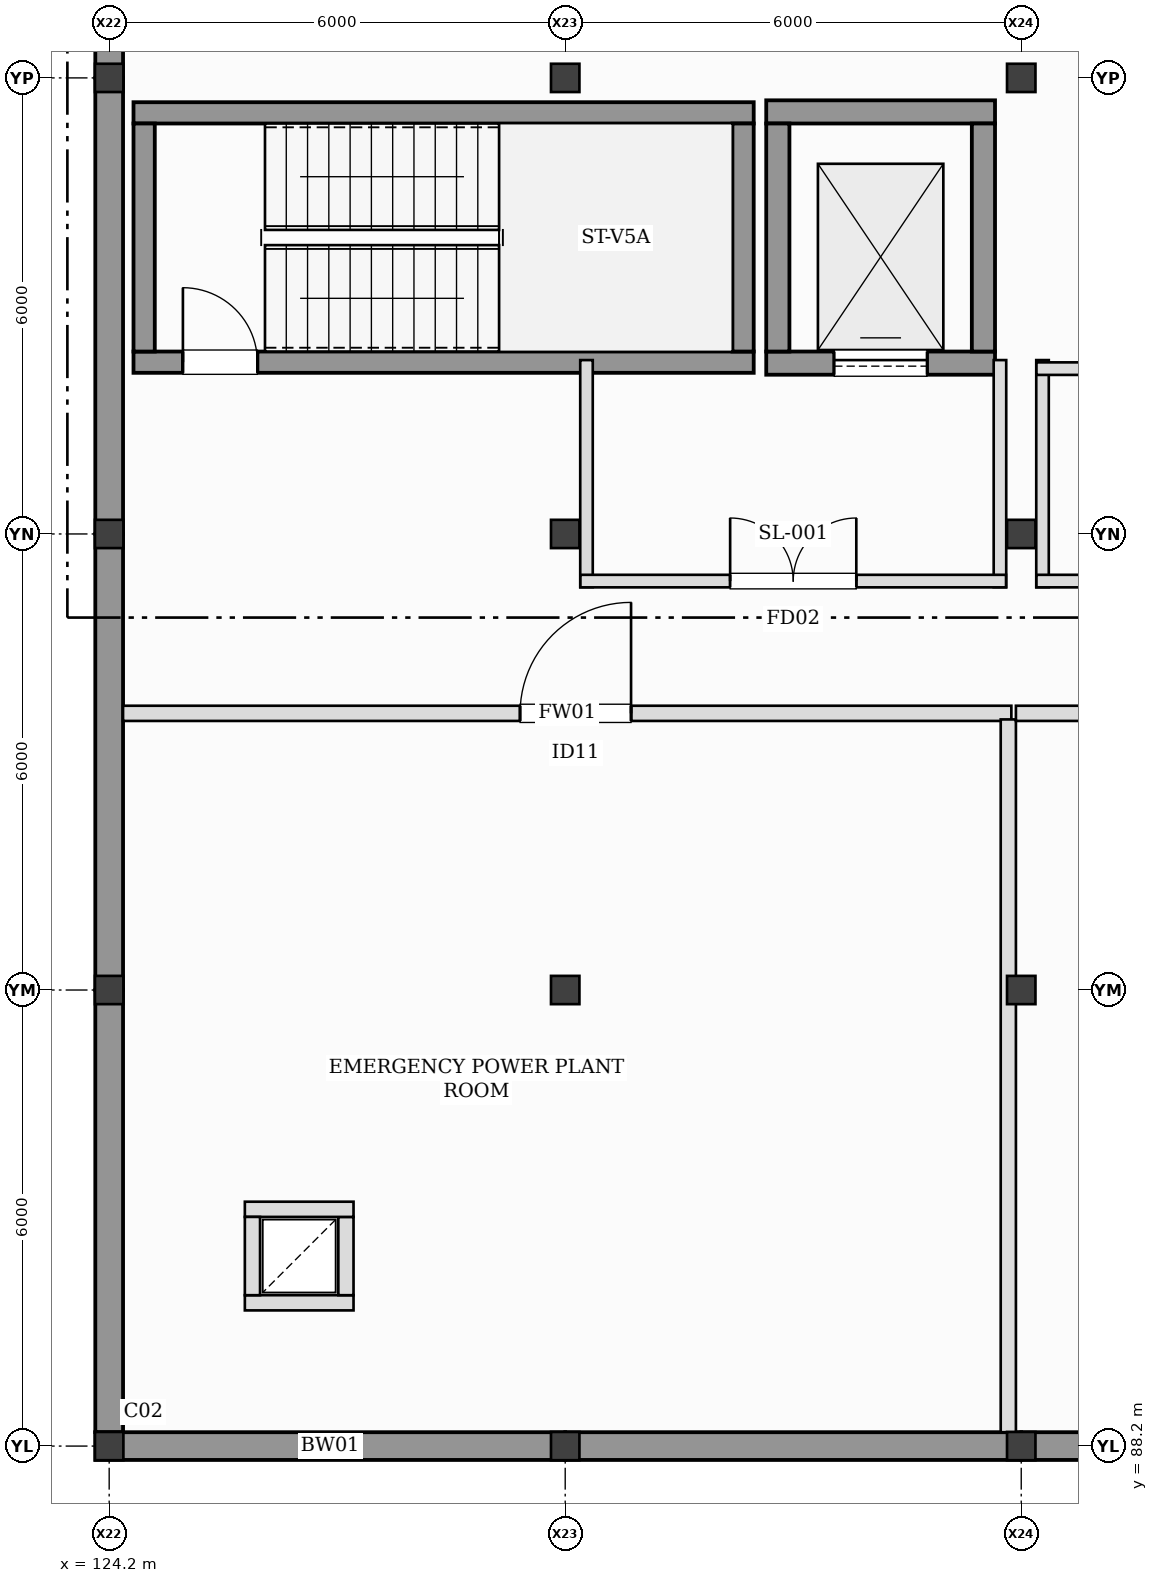
"""IFC4 building model, lengths in metres.
Left out: names, types, materials, properties, quantities, classifications, styles, units other than length and angle.
Written with IfcOpenShell. Run it as: python <this file> out.ifc"""

import sys

from ifc_helpers import new_model, si_unit, direction, frame, frame_2d, origin, origin_2d, place, context, subcontext, project, spatial, rectangle, i_section, extrude, element, fill, save


model = new_model("IFC4")
c1 = context("Model", 3, precision=1e-05, world=origin(), true_north=direction((0.0, 1.0)))
c2 = subcontext(c1, "Body", "Model", "MODEL_VIEW")
j1 = project(units=[si_unit("LENGTHUNIT", "METRE"), si_unit("PLANEANGLEUNIT", "RADIAN")], contexts=[c1])
p1 = place(None, origin())
s1 = spatial("IfcSite", under=j1, at=p1, CompositionType="ELEMENT")
p2 = place(p1, origin())
s2 = spatial("IfcBuilding", under=s1, at=p2, CompositionType="ELEMENT")
p3 = place(p2, frame((0.0, 0.0, -4.2)))
s3 = spatial("IfcBuildingStorey", under=s2, at=p3, CompositionType="ELEMENT", Elevation=-4.2)
for number, where, z_axis, x_axis in (
    (1, (124.2, 88.2, -0.45), (0.0, 0.0, 1.0), (1.0, 0.0, 0.0)),
    (2, (124.2, 94.2, -0.45), (0.0, 0.0, 1.0), (1.0, 0.0, 0.0)),
    (3, (124.2, 100.2, -0.45), (0.0, 0.0, 1.0), (1.0, 0.0, 0.0)),
    (4, (124.2, 106.2, -0.45), (0.0, 0.0, 1.0), (1.0, 0.0, 0.0)),
    (5, (130.2, 88.2, -0.45), (0.0, 0.0, 1.0), (1.0, 0.0, 0.0)),
    (6, (130.2, 94.2, -0.45), (0.0, 0.0, 1.0), (1.0, 0.0, 0.0)),
    (7, (130.2, 100.2, -0.45), (0.0, 0.0, 1.0), (1.0, 0.0, 0.0)),
    (8, (130.2, 106.2, -0.45), (0.0, 0.0, 1.0), (1.0, 0.0, 0.0)),
    (9, (136.2, 88.2, -0.45), (0.0, 0.0, 1.0), (1.0, 0.0, 0.0)),
    (10, (136.2, 94.2, -0.45), (0.0, 0.0, 1.0), (1.0, 0.0, 0.0)),
    (11, (136.2, 100.2, -0.45), (0.0, 0.0, 1.0), (1.0, 0.0, 0.0)),
    (12, (136.2, 106.2, -0.45), (0.0, 0.0, 1.0), (1.0, 0.0, 0.0)),
):
    element("IfcColumn", number, at=place(p3, frame(where, z_axis=z_axis, x_axis=x_axis)), inside=s3, PredefinedType="COLUMN", context=c2, shape_type="SweptSolid", body=[
        extrude(i_section(OverallWidth=0.374, OverallDepth=0.372, WebThickness=0.016, FlangeThickness=0.026, at=origin_2d()), origin(), (0.0, 0.0, 1.0), 4.65),
    ])
p4 = place(p3, frame((124.018, 88.2, 0.0), z_axis=(0.0, 0.0, 1.0), x_axis=(1.0, 0.0, 0.0)))
e13 = element("IfcWall", 13, at=p4, inside=s3, PredefinedType="SHEAR", context=c2, shape_type="SweptSolid", body=[
    extrude(rectangle(XDim=6.181, YDim=0.365, at=frame_2d((3.091, 0.0))), origin(), (0.0, 0.0, 1.0), 3.85),
])
for number, where, z_axis, x_axis in (
    (14, (130.201, 88.2, 0.0), (0.0, 0.0, 1.0), (1.0, 0.0, 0.0)),
    (15, (136.201, 88.2, 0.0), (0.0, 0.0, 1.0), (1.0, 0.0, 0.0)),
):
    element("IfcWall", number, at=place(p3, frame(where, z_axis=z_axis, x_axis=x_axis)), inside=s3, PredefinedType="SHEAR", context=c2, shape_type="SweptSolid", body=[
        extrude(rectangle(XDim=5.998, YDim=0.365, at=frame_2d((2.999, 0.0))), origin(), (0.0, 0.0, 1.0), 3.85),
    ])
p5 = place(p3, frame((124.2, 94.199, 0.0), z_axis=(0.0, 0.0, 1.0), x_axis=(0.0, -1.0, 0.0)))
e16 = element("IfcWall", 16, at=p5, inside=s3, PredefinedType="SHEAR", context=c2, shape_type="SweptSolid", body=[
    extrude(rectangle(XDim=5.814, YDim=0.365, at=frame_2d((2.907, 0.0))), origin(), (0.0, 0.0, 1.0), 3.85),
])
for number, where, z_axis, x_axis in (
    (17, (124.2, 100.199, 0.0), (0.0, 0.0, 1.0), (0.0, -1.0, 0.0)),
    (18, (124.2, 106.199, 0.0), (0.0, 0.0, 1.0), (0.0, -1.0, 0.0)),
):
    element("IfcWall", number, at=place(p3, frame(where, z_axis=z_axis, x_axis=x_axis)), inside=s3, PredefinedType="SHEAR", context=c2, shape_type="SweptSolid", body=[
        extrude(rectangle(XDim=5.998, YDim=0.365, at=frame_2d((2.999, 0.0))), origin(), (0.0, 0.0, 1.0), 3.85),
    ])
p6 = place(p3, frame((124.2, 112.015, 0.0), z_axis=(0.0, 0.0, 1.0), x_axis=(0.0, -1.0, 0.0)))
e19 = element("IfcWall", 19, at=p6, inside=s3, PredefinedType="SHEAR", context=c2, shape_type="SweptSolid", body=[
    extrude(rectangle(XDim=5.814, YDim=0.365, at=frame_2d((2.907, 0.0))), origin(), (0.0, 0.0, 1.0), 3.85),
])
p7 = place(p3, frame((124.52, 102.46, 0.0), z_axis=(0.0, 0.0, 1.0), x_axis=(1.0, 0.0, 0.0)))
e20 = element("IfcWall", 20, at=p7, inside=s3, PredefinedType="SHEAR", context=c2, shape_type="SweptSolid", body=[
    extrude(rectangle(XDim=8.16, YDim=0.28, at=frame_2d((4.08, 0.0))), origin(), (0.0, 0.0, 1.0), 4.2),
])
p8 = place(p7, frame((0.65, 0.0, 0.0)))
e21 = element("IfcOpeningElement", 21, at=p8, cuts=e20, PredefinedType="OPENING", context=c2, shape_type="SweptSolid", body=[
    extrude(rectangle(XDim=0.98, YDim=2.15, at=frame_2d((0.49, 1.075))), frame((0.0, 0.15, 0.0), z_axis=(0.0, -1.0, 0.0), x_axis=(1.0, 0.0, 0.0)), (0.0, 0.0, 1.0), 0.3),
])
p9 = place(p3, frame((132.68, 105.74, 0.0), z_axis=(0.0, 0.0, 1.0), x_axis=(-1.0, 0.0, 0.0)))
e22 = element("IfcWall", 22, at=p9, inside=s3, PredefinedType="SHEAR", context=c2, shape_type="SweptSolid", body=[
    extrude(rectangle(XDim=8.16, YDim=0.28, at=frame_2d((4.08, 0.0))), origin(), (0.0, 0.0, 1.0), 4.2),
])
for number, where, z_axis, x_axis in (
    (23, (124.66, 105.6, 0.0), (0.0, 0.0, 1.0), (0.0, -1.0, 0.0)),
    (24, (132.54, 102.6, 0.0), (0.0, 0.0, 1.0), (0.0, 1.0, 0.0)),
):
    element("IfcWall", number, at=place(p3, frame(where, z_axis=z_axis, x_axis=x_axis)), inside=s3, PredefinedType="SHEAR", context=c2, shape_type="SweptSolid", body=[
        extrude(rectangle(XDim=3.0, YDim=0.28, at=frame_2d((1.5, 0.0))), origin(), (0.0, 0.0, 1.0), 4.2),
    ])
p10 = place(p3, frame((132.845, 102.448, 0.0), z_axis=(0.0, 0.0, 1.0), x_axis=(1.0, 0.0, 0.0)))
e25 = element("IfcWall", 25, at=p10, inside=s3, PredefinedType="SHEAR", context=c2, shape_type="SweptSolid", body=[
    extrude(rectangle(XDim=3.01, YDim=0.305, at=frame_2d((1.505, 0.0))), origin(), (0.0, 0.0, 1.0), 4.2),
])
p11 = place(p10, frame((0.895, 0.0, 0.0)))
e26 = element("IfcOpeningElement", 26, at=p11, cuts=e25, PredefinedType="OPENING", context=c2, shape_type="SweptSolid", body=[
    extrude(rectangle(XDim=1.22, YDim=2.22, at=frame_2d((0.61, 1.11))), frame((0.0, 0.162, 0.0), z_axis=(0.0, -1.0, 0.0), x_axis=(1.0, 0.0, 0.0)), (0.0, 0.0, 1.0), 0.325),
])
p12 = place(p3, frame((135.855, 105.752, 0.0), z_axis=(0.0, 0.0, 1.0), x_axis=(-1.0, 0.0, 0.0)))
e27 = element("IfcWall", 27, at=p12, inside=s3, PredefinedType="SHEAR", context=c2, shape_type="SweptSolid", body=[
    extrude(rectangle(XDim=3.01, YDim=0.305, at=frame_2d((1.505, 0.0))), origin(), (0.0, 0.0, 1.0), 4.2),
])
for number, where, z_axis, x_axis in (
    (28, (132.998, 105.6, 0.0), (0.0, 0.0, 1.0), (0.0, -1.0, 0.0)),
    (29, (135.702, 102.6, 0.0), (0.0, 0.0, 1.0), (0.0, 1.0, 0.0)),
):
    element("IfcWall", number, at=place(p3, frame(where, z_axis=z_axis, x_axis=x_axis)), inside=s3, PredefinedType="SHEAR", context=c2, shape_type="SweptSolid", body=[
        extrude(rectangle(XDim=3.0, YDim=0.305, at=frame_2d((1.5, 0.0))), origin(), (0.0, 0.0, 1.0), 4.2),
    ])
for number, where, z_axis, x_axis in (
    (30, (130.48, 99.5, 0.0), (0.0, 0.0, 1.0), (0.0, 1.0, 0.0)),
    (31, (135.92, 102.488, 0.0), (0.0, 0.0, 1.0), (0.0, -1.0, 0.0)),
):
    element("IfcWall", number, at=place(p3, frame(where, z_axis=z_axis, x_axis=x_axis)), inside=s3, PredefinedType="PARTITIONING", context=c2, shape_type="SweptSolid", body=[
        extrude(rectangle(XDim=2.988, YDim=0.165, at=frame_2d((1.494, 0.0))), origin(), (0.0, 0.0, 1.0), 3.79),
    ])
p13 = place(p3, frame((130.4, 99.58, 0.0), z_axis=(0.0, 0.0, 1.0), x_axis=(1.0, 0.0, 0.0)))
e32 = element("IfcWall", 32, at=p13, inside=s3, PredefinedType="PARTITIONING", context=c2, shape_type="SweptSolid", body=[
    extrude(rectangle(XDim=5.6, YDim=0.165, at=frame_2d((2.8, 0.0))), origin(), (0.0, 0.0, 1.0), 3.79),
])
p14 = place(p13, frame((1.97, 0.0, 0.0)))
e33 = element("IfcOpeningElement", 33, at=p14, cuts=e32, PredefinedType="OPENING", context=c2, shape_type="SweptSolid", body=[
    extrude(rectangle(XDim=1.66, YDim=2.2, at=frame_2d((0.83, 1.1))), frame((0.0, 0.093, 0.0), z_axis=(0.0, -1.0, 0.0), x_axis=(1.0, 0.0, 0.0)), (0.0, 0.0, 1.0), 0.185),
])
p15 = place(p3, frame((136.48, 99.5, 0.0), z_axis=(0.0, 0.0, 1.0), x_axis=(0.0, 1.0, 0.0)))
e34 = element("IfcWall", 34, at=p15, inside=s3, PredefinedType="PARTITIONING", context=c2, shape_type="SweptSolid", body=[
    extrude(rectangle(XDim=2.988, YDim=0.165, at=frame_2d((1.494, 0.0))), origin(), (0.0, 0.0, 1.0), 3.79),
])
p16 = place(p3, frame((136.4, 102.375, 0.0), z_axis=(0.0, 0.0, 1.0), x_axis=(1.0, 0.0, 0.0)))
e35 = element("IfcWall", 35, at=p16, inside=s3, PredefinedType="PARTITIONING", context=c2, shape_type="SweptSolid", body=[
    extrude(rectangle(XDim=1.365, YDim=0.165, at=frame_2d((0.683, 0.0))), origin(), (0.0, 0.0, 1.0), 3.79),
])
p17 = place(p3, frame((136.4, 99.58, 0.0), z_axis=(0.0, 0.0, 1.0), x_axis=(1.0, 0.0, 0.0)))
e36 = element("IfcWall", 36, at=p17, inside=s3, PredefinedType="PARTITIONING", context=c2, shape_type="SweptSolid", body=[
    extrude(rectangle(XDim=5.6, YDim=0.165, at=frame_2d((2.8, 0.0))), origin(), (0.0, 0.0, 1.0), 3.79),
])
p18 = place(p17, frame((1.97, 0.0, 0.0)))
e37 = element("IfcOpeningElement", 37, at=p18, cuts=e36, PredefinedType="OPENING", context=c2, shape_type="SweptSolid", body=[
    extrude(rectangle(XDim=1.66, YDim=2.2, at=frame_2d((0.83, 1.1))), frame((0.0, 0.093, 0.0), z_axis=(0.0, -1.0, 0.0), x_axis=(1.0, 0.0, 0.0)), (0.0, 0.0, 1.0), 0.185),
])
p19 = place(p3, frame((125.985, 90.085, 0.0), z_axis=(0.0, 0.0, 1.0), x_axis=(1.0, 0.0, 0.0)))
e38 = element("IfcWall", 38, at=p19, inside=s3, PredefinedType="PARTITIONING", context=c2, shape_type="SweptSolid", body=[
    extrude(rectangle(XDim=1.43, YDim=0.2, at=frame_2d((0.715, 0.0))), origin(), (0.0, 0.0, 1.0), 3.79),
])
p20 = place(p3, frame((127.315, 90.185, 0.0), z_axis=(0.0, 0.0, 1.0), x_axis=(0.0, 1.0, 0.0)))
e39 = element("IfcWall", 39, at=p20, inside=s3, PredefinedType="PARTITIONING", context=c2, shape_type="SweptSolid", body=[
    extrude(rectangle(XDim=1.03, YDim=0.2, at=frame_2d((0.515, 0.0))), origin(), (0.0, 0.0, 1.0), 3.79),
])
p21 = place(p3, frame((127.415, 91.315, 0.0), z_axis=(0.0, 0.0, 1.0), x_axis=(-1.0, 0.0, 0.0)))
e40 = element("IfcWall", 40, at=p21, inside=s3, PredefinedType="PARTITIONING", context=c2, shape_type="SweptSolid", body=[
    extrude(rectangle(XDim=1.43, YDim=0.2, at=frame_2d((0.715, 0.0))), origin(), (0.0, 0.0, 1.0), 3.79),
])
p22 = place(p3, frame((126.085, 91.215, 0.0), z_axis=(0.0, 0.0, 1.0), x_axis=(0.0, -1.0, 0.0)))
e41 = element("IfcWall", 41, at=p22, inside=s3, PredefinedType="PARTITIONING", context=c2, shape_type="SweptSolid", body=[
    extrude(rectangle(XDim=1.03, YDim=0.2, at=frame_2d((0.515, 0.0))), origin(), (0.0, 0.0, 1.0), 3.79),
])
p23 = place(p3, frame((124.383, 97.84, 0.0), z_axis=(0.0, 0.0, 1.0), x_axis=(1.0, 0.0, 0.0)))
e42 = element("IfcWall", 42, at=p23, inside=s3, PredefinedType="PARTITIONING", context=c2, shape_type="SweptSolid", body=[
    extrude(rectangle(XDim=11.688, YDim=0.2, at=frame_2d((5.844, 0.0))), origin(), (0.0, 0.0, 1.0), 3.79),
])
p24 = place(p23, frame((5.224, 0.0, 0.0)))
e43 = element("IfcOpeningElement", 43, at=p24, cuts=e42, PredefinedType="OPENING", context=c2, shape_type="SweptSolid", body=[
    extrude(rectangle(XDim=1.46, YDim=2.3, at=frame_2d((0.73, 1.15))), frame((0.0, 0.11, 0.0), z_axis=(0.0, -1.0, 0.0), x_axis=(1.0, 0.0, 0.0)), (0.0, 0.0, 1.0), 0.22),
])
p25 = place(p3, frame((136.03, 97.76, 0.0), z_axis=(0.0, 0.0, 1.0), x_axis=(0.0, -1.0, 0.0)))
e44 = element("IfcWall", 44, at=p25, inside=s3, PredefinedType="PARTITIONING", context=c2, shape_type="SweptSolid", body=[
    extrude(rectangle(XDim=9.377, YDim=0.2, at=frame_2d((4.689, 0.0))), origin(), (0.0, 0.0, 1.0), 3.79),
])
p26 = place(p3, frame((136.13, 97.84, 0.0), z_axis=(0.0, 0.0, 1.0), x_axis=(1.0, 0.0, 0.0)))
e45 = element("IfcWall", 45, at=p26, inside=s3, PredefinedType="PARTITIONING", context=c2, shape_type="SweptSolid", body=[
    extrude(rectangle(XDim=11.94, YDim=0.2, at=frame_2d((5.97, 0.0))), origin(), (0.0, 0.0, 1.0), 3.79),
])
p27 = place(p26, frame((5.24, 0.0, 0.0)))
e46 = element("IfcOpeningElement", 46, at=p27, cuts=e45, PredefinedType="OPENING", context=c2, shape_type="SweptSolid", body=[
    extrude(rectangle(XDim=1.46, YDim=2.3, at=frame_2d((0.73, 1.15))), frame((0.0, 0.11, 0.0), z_axis=(0.0, -1.0, 0.0), x_axis=(1.0, 0.0, 0.0)), (0.0, 0.0, 1.0), 0.22),
])
p28 = place(p8, origin())
e47 = element("IfcDoor", 47, at=p28, inside=s3, OperationType="SINGLE_SWING_LEFT", PredefinedType="DOOR", context=c2, shape_type="SweptSolid", body=[
    extrude(rectangle(XDim=0.98, YDim=2.15, at=frame_2d((0.49, 1.075))), frame((0.0, 0.025, 0.0), z_axis=(0.0, -1.0, 0.0), x_axis=(1.0, 0.0, 0.0)), (0.0, 0.0, 1.0), 0.05),
])
fill(e21, e47)
p29 = place(p11, origin())
e48 = element("IfcDoor", 48, at=p29, inside=s3, OperationType="SLIDING_TO_LEFT", PredefinedType="DOOR", context=c2, shape_type="SweptSolid", body=[
    extrude(rectangle(XDim=1.22, YDim=2.22, at=frame_2d((0.61, 1.11))), frame((0.0, 0.025, 0.0), z_axis=(0.0, -1.0, 0.0), x_axis=(1.0, 0.0, 0.0)), (0.0, 0.0, 1.0), 0.05),
])
fill(e26, e48)
p30 = place(p14, frame((1.66, 0.0, 0.0), z_axis=(0.0, 0.0, 1.0), x_axis=(-1.0, 0.0, 0.0)))
e49 = element("IfcDoor", 49, at=p30, inside=s3, OperationType="DOUBLE_DOOR_SINGLE_SWING", PredefinedType="DOOR", context=c2, shape_type="SweptSolid", body=[
    extrude(rectangle(XDim=1.66, YDim=2.2, at=frame_2d((0.83, 1.1))), frame((0.0, 0.025, 0.0), z_axis=(0.0, -1.0, 0.0), x_axis=(1.0, 0.0, 0.0)), (0.0, 0.0, 1.0), 0.05),
])
fill(e33, e49)
p31 = place(p24, frame((1.46, 0.0, 0.0), z_axis=(0.0, 0.0, 1.0), x_axis=(-1.0, 0.0, 0.0)))
e50 = element("IfcDoor", 50, at=p31, inside=s3, OperationType="SINGLE_SWING_RIGHT", PredefinedType="DOOR", context=c2, shape_type="SweptSolid", body=[
    extrude(rectangle(XDim=1.46, YDim=2.3, at=frame_2d((0.73, 1.15))), frame((0.0, 0.025, 0.0), z_axis=(0.0, -1.0, 0.0), x_axis=(1.0, 0.0, 0.0)), (0.0, 0.0, 1.0), 0.05),
])
fill(e43, e50)
save(model, sys.argv[1])
